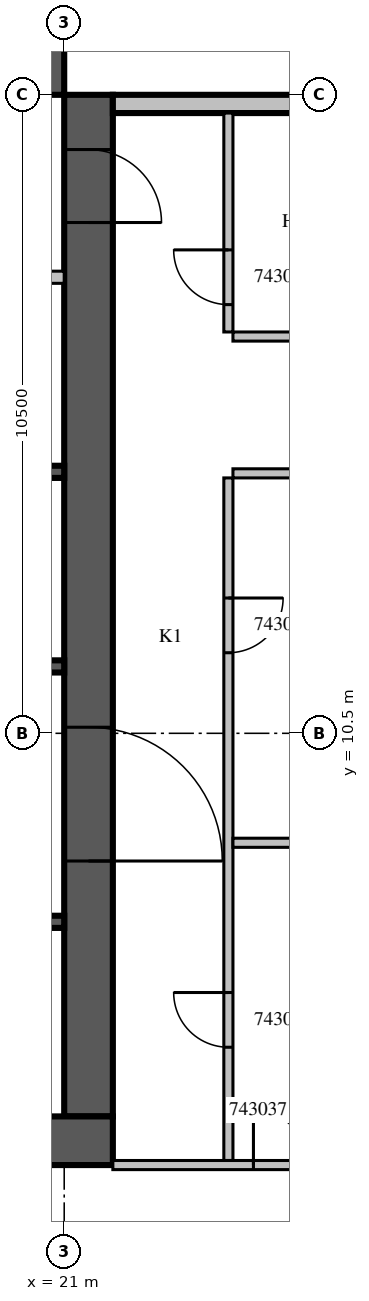
"""IFC4 building model, lengths in metres.
Left out: names, types, materials, properties, quantities, classifications, styles, units other than length and angle.
Written with IfcOpenShell. Run it as: python <this file> out.ifc"""

import sys

from ifc_helpers import new_model, si_unit, direction, frame, frame_2d, origin, place, context, subcontext, project, spatial, rectangle, extrude, source, transform, mapped, element, fill, save


model = new_model("IFC4")
c1 = context("Model", 3, precision=1e-05, world=origin(), true_north=direction((0.0, 1.0)))
c2 = subcontext(c1, "Body", "Model", "MODEL_VIEW")
j1 = project(units=[si_unit("LENGTHUNIT", "METRE"), si_unit("PLANEANGLEUNIT", "RADIAN")], contexts=[c1])
p1 = place(None, origin())
s1 = spatial("IfcSite", under=j1, at=p1, CompositionType="ELEMENT")
p2 = place(p1, origin())
s2 = spatial("IfcBuilding", under=s1, at=p2, CompositionType="ELEMENT")
p3 = place(p2, frame((0.0, 0.0, 196.8)))
s3 = spatial("IfcBuildingStorey", under=s2, at=p3, CompositionType="ELEMENT", Elevation=196.8)
m1 = source(origin(), c2, "Body", "SweptSolid", [
    extrude(rectangle(XDim=16.8, YDim=0.8, at=frame_2d((8.4, 0.0))), origin(), (0.0, 0.0, 1.0), 3.8),
])
p4 = place(p3, frame((21.4, 4.2, 0.0), z_axis=(0.0, 0.0, 1.0), x_axis=(0.0, 1.0, 0.0)))
e1 = element("IfcWall", 1, at=p4, inside=s3, PredefinedType="SHEAR", context=c2, shape_type="MappedRepresentation", body=[
    mapped(m1, transform((0.0, 0.0, 0.0), scale=1.0)),
])
m2 = source(origin(), c2, "Body", "SweptSolid", [
    extrude(rectangle(XDim=2.2, YDim=2.1, at=frame_2d((1.1, 1.05))), frame((0.0, 0.41, 0.0), z_axis=(0.0, -1.0, 0.0), x_axis=(1.0, 0.0, 0.0)), (0.0, 0.0, 1.0), 0.82),
])
p5 = place(p4, frame((4.2, 0.0, 0.0)))
e2 = element("IfcOpeningElement", 2, at=p5, cuts=e1, PredefinedType="OPENING", context=c2, shape_type="MappedRepresentation", body=[
    mapped(m2, transform((0.0, 0.0, 0.0), scale=1.0)),
])
m3 = source(origin(), c2, "Body", "SweptSolid", [
    extrude(rectangle(XDim=1.2, YDim=2.1, at=frame_2d((0.6, 1.05))), frame((0.0, 0.41, 0.0), z_axis=(0.0, -1.0, 0.0), x_axis=(1.0, 0.0, 0.0)), (0.0, 0.0, 1.0), 0.82),
])
p6 = place(p4, frame((14.7, 0.0, 0.0)))
e3 = element("IfcOpeningElement", 3, at=p6, cuts=e1, PredefinedType="OPENING", context=c2, shape_type="MappedRepresentation", body=[
    mapped(m3, transform((0.0, 0.0, 0.0), scale=1.0)),
])
m4 = source(origin(), c2, "Body", "SweptSolid", [
    extrude(rectangle(XDim=17.6, YDim=0.8, at=frame_2d((8.8, 0.0))), origin(), (0.0, 0.0, 1.0), 3.8),
])
p7 = place(p3, frame((4.2, 3.8, 0.0), z_axis=(0.0, 0.0, 1.0), x_axis=(1.0, 0.0, 0.0)))
e4 = element("IfcWall", 4, at=p7, inside=s3, PredefinedType="SHEAR", context=c2, shape_type="MappedRepresentation", body=[
    mapped(m4, transform((0.0, 0.0, 0.0), scale=1.0)),
])
m5 = source(origin(), c2, "Body", "SweptSolid", [
    extrude(rectangle(XDim=0.9, YDim=2.1, at=frame_2d((0.45, 1.05))), frame((0.0, 0.41, 0.0), z_axis=(0.0, -1.0, 0.0), x_axis=(1.0, 0.0, 0.0)), (0.0, 0.0, 1.0), 0.82),
])
p8 = place(p7, frame((12.75, 0.0, 0.0)))
e5 = element("IfcOpeningElement", 5, at=p8, cuts=e4, PredefinedType="OPENING", context=c2, shape_type="MappedRepresentation", body=[
    mapped(m5, transform((0.0, 0.0, 0.0), scale=1.0)),
])
p9 = place(p3, frame((4.2, 21.4, 0.0), z_axis=(0.0, 0.0, 1.0), x_axis=(1.0, 0.0, 0.0)))
e6 = element("IfcWall", 6, at=p9, inside=s3, PredefinedType="SHEAR", context=c2, shape_type="MappedRepresentation", body=[
    mapped(m1, transform((0.0, 0.0, 0.0), scale=1.0)),
])
p10 = place(p9, frame((6.2, 0.0, 0.0)))
e7 = element("IfcOpeningElement", 7, at=p10, cuts=e6, PredefinedType="OPENING", context=c2, shape_type="MappedRepresentation", body=[
    mapped(m3, transform((0.0, 0.0, 0.0), scale=1.0)),
])
m6 = source(origin(), c2, "Body", "SweptSolid", [
    extrude(rectangle(XDim=7.15, YDim=0.3, at=frame_2d((3.575, 0.0))), origin(), (0.0, 0.0, 1.0), 3.4),
])
p11 = place(p3, frame((28.95, 20.85, 0.0), z_axis=(0.0, 0.0, 1.0), x_axis=(-1.0, 0.0, 0.0)))
e8 = element("IfcWall", 8, at=p11, inside=s3, PredefinedType="STANDARD", context=c2, shape_type="MappedRepresentation", body=[
    mapped(m6, transform((0.0, 0.0, 0.0), scale=1.0)),
])
m7 = source(origin(), c2, "Body", "SweptSolid", [
    extrude(rectangle(XDim=3.0, YDim=2.3, at=frame_2d((1.5, 1.15))), frame((0.0, 0.16, 0.0), z_axis=(0.0, -1.0, 0.0), x_axis=(1.0, 0.0, 0.0)), (0.0, 0.0, 1.0), 0.32),
])
p12 = place(p11, frame((0.15, 0.0, 0.6)))
e9 = element("IfcOpeningElement", 9, at=p12, cuts=e8, PredefinedType="OPENING", context=c2, shape_type="MappedRepresentation", body=[
    mapped(m7, transform((0.0, 0.0, 0.0), scale=1.0)),
])
m8 = source(origin(), c2, "Body", "SweptSolid", [
    extrude(rectangle(XDim=2.4, YDim=0.2, at=frame_2d((1.2, 0.0))), origin(), (0.0, 0.0, 1.0), 3.8),
])
p13 = place(p3, frame((18.6, 7.4, 0.0), z_axis=(0.0, 0.0, 1.0), x_axis=(1.0, 0.0, 0.0)))
e10 = element("IfcWall", 10, at=p13, inside=s3, PredefinedType="SOLIDWALL", context=c2, shape_type="MappedRepresentation", body=[
    mapped(m8, transform((0.0, 0.0, 0.0), scale=1.0)),
])
m9 = source(origin(), c2, "Body", "SweptSolid", [
    extrude(rectangle(XDim=9.6, YDim=0.2, at=frame_2d((4.8, 0.0))), origin(), (0.0, 0.0, 1.0), 3.8),
])
p14 = place(p3, frame((11.4, 11.6, 0.0), z_axis=(0.0, 0.0, 1.0), x_axis=(1.0, 0.0, 0.0)))
e11 = element("IfcWall", 11, at=p14, inside=s3, PredefinedType="SOLIDWALL", context=c2, shape_type="MappedRepresentation", body=[
    mapped(m9, transform((0.0, 0.0, 0.0), scale=1.0)),
])
p15 = place(p3, frame((11.4, 14.8, 0.0), z_axis=(0.0, 0.0, 1.0), x_axis=(1.0, 0.0, 0.0)))
e12 = element("IfcWall", 12, at=p15, inside=s3, PredefinedType="SOLIDWALL", context=c2, shape_type="MappedRepresentation", body=[
    mapped(m9, transform((0.0, 0.0, 0.0), scale=1.0)),
])
m10 = source(origin(), c2, "Body", "SweptSolid", [
    extrude(rectangle(XDim=1.1, YDim=2.1, at=frame_2d((0.55, 1.05))), frame((0.0, 0.11, 0.0), z_axis=(0.0, -1.0, 0.0), x_axis=(1.0, 0.0, 0.0)), (0.0, 0.0, 1.0), 0.22),
])
p16 = place(p15, frame((3.05, 0.0, 0.0)))
e13 = element("IfcOpeningElement", 13, at=p16, cuts=e12, PredefinedType="OPENING", context=c2, shape_type="MappedRepresentation", body=[
    mapped(m10, transform((0.0, 0.0, 0.0), scale=1.0)),
])
p17 = place(p15, frame((5.45, 0.0, 0.0)))
e14 = element("IfcOpeningElement", 14, at=p17, cuts=e12, PredefinedType="OPENING", context=c2, shape_type="MappedRepresentation", body=[
    mapped(m10, transform((0.0, 0.0, 0.0), scale=1.0)),
])
p18 = place(p15, frame((7.85, 0.0, 0.0)))
e15 = element("IfcOpeningElement", 15, at=p18, cuts=e12, PredefinedType="OPENING", context=c2, shape_type="MappedRepresentation", body=[
    mapped(m10, transform((0.0, 0.0, 0.0), scale=1.0)),
])
m11 = source(origin(), c2, "Body", "SweptSolid", [
    extrude(rectangle(XDim=11.45, YDim=0.2, at=frame_2d((5.725, 0.0))), origin(), (0.0, 0.0, 1.0), 3.4),
])
p19 = place(p3, frame((9.55, 18.0, 0.0), z_axis=(0.0, 0.0, 1.0), x_axis=(1.0, 0.0, 0.0)))
e16 = element("IfcWall", 16, at=p19, inside=s3, PredefinedType="PARTITIONING", context=c2, shape_type="MappedRepresentation", body=[
    mapped(m11, transform((0.0, 0.0, 0.0), scale=1.0)),
])
m12 = source(origin(), c2, "Body", "SweptSolid", [
    extrude(rectangle(XDim=0.9, YDim=2.1, at=frame_2d((0.45, 1.05))), frame((0.0, 0.11, 0.0), z_axis=(0.0, -1.0, 0.0), x_axis=(1.0, 0.0, 0.0)), (0.0, 0.0, 1.0), 0.22),
])
p20 = place(p19, frame((0.475, 0.0, 0.0)))
e17 = element("IfcOpeningElement", 17, at=p20, cuts=e16, PredefinedType="OPENING", context=c2, shape_type="MappedRepresentation", body=[
    mapped(m12, transform((0.0, 0.0, 0.0), scale=1.0)),
])
p21 = place(p19, frame((1.85, 0.0, 0.0)))
e18 = element("IfcOpeningElement", 18, at=p21, cuts=e16, PredefinedType="OPENING", context=c2, shape_type="MappedRepresentation", body=[
    mapped(m12, transform((0.0, 0.0, 0.0), scale=1.0)),
])
p22 = place(p19, frame((3.125, 0.0, 0.0)))
e19 = element("IfcOpeningElement", 19, at=p22, cuts=e16, PredefinedType="OPENING", context=c2, shape_type="MappedRepresentation", body=[
    mapped(m12, transform((0.0, 0.0, 0.0), scale=1.0)),
])
p23 = place(p19, frame((7.35, 0.0, 0.0)))
e20 = element("IfcOpeningElement", 20, at=p23, cuts=e16, PredefinedType="OPENING", context=c2, shape_type="MappedRepresentation", body=[
    mapped(m10, transform((0.0, 0.0, 0.0), scale=1.0)),
])
p24 = place(p3, frame((23.7, 14.7, 0.0), z_axis=(0.0, 0.0, 1.0), x_axis=(0.0, -1.0, 0.0)))
e21 = element("IfcWall", 21, at=p24, inside=s3, PredefinedType="PARTITIONING", context=c2, shape_type="SweptSolid", body=[
    extrude(rectangle(XDim=11.225, YDim=0.15, at=frame_2d((5.612, 0.0))), origin(), (0.0, 0.0, 1.0), 3.4),
])
m13 = source(origin(), c2, "Body", "SweptSolid", [
    extrude(rectangle(XDim=0.9, YDim=2.1, at=frame_2d((0.45, 1.05))), frame((0.0, 0.085, 0.0), z_axis=(0.0, -1.0, 0.0), x_axis=(1.0, 0.0, 0.0)), (0.0, 0.0, 1.0), 0.17),
])
p25 = place(p24, frame((8.463, 0.0, 0.0)))
e22 = element("IfcOpeningElement", 22, at=p25, cuts=e21, PredefinedType="OPENING", context=c2, shape_type="MappedRepresentation", body=[
    mapped(m13, transform((0.0, 0.0, 0.0), scale=1.0)),
])
p26 = place(p24, frame((1.975, 0.0, 0.0)))
e23 = element("IfcOpeningElement", 23, at=p26, cuts=e21, PredefinedType="OPENING", context=c2, shape_type="MappedRepresentation", body=[
    mapped(m13, transform((0.0, 0.0, 0.0), scale=1.0)),
])
m14 = source(origin(), c2, "Body", "SweptSolid", [
    extrude(rectangle(XDim=3.6, YDim=0.15, at=frame_2d((1.8, 0.0))), origin(), (0.0, 0.0, 1.0), 3.4),
])
p27 = place(p3, frame((23.7, 20.7, 0.0), z_axis=(0.0, 0.0, 1.0), x_axis=(0.0, -1.0, 0.0)))
e24 = element("IfcWall", 24, at=p27, inside=s3, PredefinedType="PARTITIONING", context=c2, shape_type="MappedRepresentation", body=[
    mapped(m14, transform((0.0, 0.0, 0.0), scale=1.0)),
])
p28 = place(p27, frame((2.25, 0.0, 0.0)))
e25 = element("IfcOpeningElement", 25, at=p28, cuts=e24, PredefinedType="OPENING", context=c2, shape_type="MappedRepresentation", body=[
    mapped(m13, transform((0.0, 0.0, 0.0), scale=1.0)),
])
m15 = source(origin(), c2, "Body", "SweptSolid", [
    extrude(rectangle(XDim=5.55, YDim=0.15, at=frame_2d((2.775, 0.0))), origin(), (0.0, 0.0, 1.0), 3.4),
])
for number, where, z_axis, x_axis in (
    (26, (29.325, 8.7, 0.0), (0.0, 0.0, 1.0), (-1.0, 0.0, 0.0)),
    (27, (29.325, 14.775, 0.0), (0.0, 0.0, 1.0), (-1.0, 0.0, 0.0)),
    (28, (23.775, 17.025, 0.0), (0.0, 0.0, 1.0), (1.0, 0.0, 0.0)),
):
    element("IfcWall", number, at=place(p3, frame(where, z_axis=z_axis, x_axis=x_axis)), inside=s3, PredefinedType="PARTITIONING", context=c2, shape_type="MappedRepresentation", body=[
        mapped(m15, transform((0.0, 0.0, 0.0), scale=1.0)),
    ])
m16 = source(origin(), c2, "Body", "SweptSolid", [
    extrude(rectangle(XDim=7.525, YDim=0.15, at=frame_2d((3.763, 0.0))), origin(), (0.0, 0.0, 1.0), 3.4),
])
p29 = place(p3, frame((21.8, 3.4, 0.0), z_axis=(0.0, 0.0, 1.0), x_axis=(1.0, 0.0, 0.0)))
e29 = element("IfcWall", 29, at=p29, inside=s3, PredefinedType="PARTITIONING", context=c2, shape_type="MappedRepresentation", body=[
    mapped(m16, transform((0.0, 0.0, 0.0), scale=1.0)),
])
m17 = source(origin(), c2, "Body", "SweptSolid", [
    extrude(rectangle(XDim=1.0, YDim=2.1, at=frame_2d((0.5, 1.05))), frame((0.0, 0.085, 0.0), z_axis=(0.0, -1.0, 0.0), x_axis=(1.0, 0.0, 0.0)), (0.0, 0.0, 1.0), 0.17),
])
p30 = place(p29, frame((3.3, 0.0, 0.0)))
e30 = element("IfcOpeningElement", 30, at=p30, cuts=e29, PredefinedType="OPENING", context=c2, shape_type="MappedRepresentation", body=[
    mapped(m17, transform((0.0, 0.0, 0.0), scale=1.0)),
])
p31 = place(p29, frame((2.312, 0.0, 0.0)))
e31 = element("IfcOpeningElement", 31, at=p31, cuts=e29, PredefinedType="OPENING", context=c2, shape_type="MappedRepresentation", body=[
    mapped(m13, transform((0.0, 0.0, 0.0), scale=1.0)),
])
m18 = source(origin(), c2, "Body", "SweptSolid", [
    extrude(rectangle(XDim=2.2, YDim=2.1, at=frame_2d((1.1, 1.05))), frame((0.0, 0.025, 0.0), z_axis=(0.0, -1.0, 0.0), x_axis=(1.0, 0.0, 0.0)), (0.0, 0.0, 1.0), 0.05),
])
p32 = place(p5, origin())
e32 = element("IfcDoor", 32, at=p32, inside=s3, OperationType="DOUBLE_DOOR_SINGLE_SWING", PredefinedType="DOOR", context=c2, shape_type="MappedRepresentation", body=[
    mapped(m18, transform((0.0, 0.0, 0.0), scale=1.0)),
])
fill(e2, e32)
m19 = source(origin(), c2, "Body", "SweptSolid", [
    extrude(rectangle(XDim=1.2, YDim=2.1, at=frame_2d((0.6, 1.05))), frame((0.0, 0.025, 0.0), z_axis=(0.0, -1.0, 0.0), x_axis=(1.0, 0.0, 0.0)), (0.0, 0.0, 1.0), 0.05),
])
p33 = place(p6, origin())
e33 = element("IfcDoor", 33, at=p33, inside=s3, OperationType="SINGLE_SWING_RIGHT", PredefinedType="DOOR", context=c2, shape_type="MappedRepresentation", body=[
    mapped(m19, transform((0.0, 0.0, 0.0), scale=1.0)),
])
fill(e3, e33)
m20 = source(origin(), c2, "Body", "SweptSolid", [
    extrude(rectangle(XDim=0.9, YDim=2.1, at=frame_2d((0.45, 1.05))), frame((0.0, 0.025, 0.0), z_axis=(0.0, -1.0, 0.0), x_axis=(1.0, 0.0, 0.0)), (0.0, 0.0, 1.0), 0.05),
])
p34 = place(p25, origin())
e34 = element("IfcDoor", 34, at=p34, inside=s3, OperationType="SINGLE_SWING_RIGHT", PredefinedType="DOOR", context=c2, shape_type="MappedRepresentation", body=[
    mapped(m20, transform((0.0, 0.0, 0.0), scale=1.0)),
])
fill(e22, e34)
p35 = place(p26, origin())
e35 = element("IfcDoor", 35, at=p35, inside=s3, OperationType="SINGLE_SWING_LEFT", PredefinedType="DOOR", context=c2, shape_type="MappedRepresentation", body=[
    mapped(m20, transform((0.0, 0.0, 0.0), scale=1.0)),
])
fill(e23, e35)
p36 = place(p28, origin())
e36 = element("IfcDoor", 36, at=p36, inside=s3, OperationType="SINGLE_SWING_RIGHT", PredefinedType="DOOR", context=c2, shape_type="MappedRepresentation", body=[
    mapped(m20, transform((0.0, 0.0, 0.0), scale=1.0)),
])
fill(e25, e36)
p37 = place(p31, origin())
e37 = element("IfcDoor", 37, at=p37, inside=s3, OperationType="SINGLE_SWING_LEFT", PredefinedType="DOOR", context=c2, shape_type="MappedRepresentation", body=[
    mapped(m20, transform((0.0, 0.0, 0.0), scale=1.0)),
])
fill(e31, e37)
save(model, sys.argv[1])
